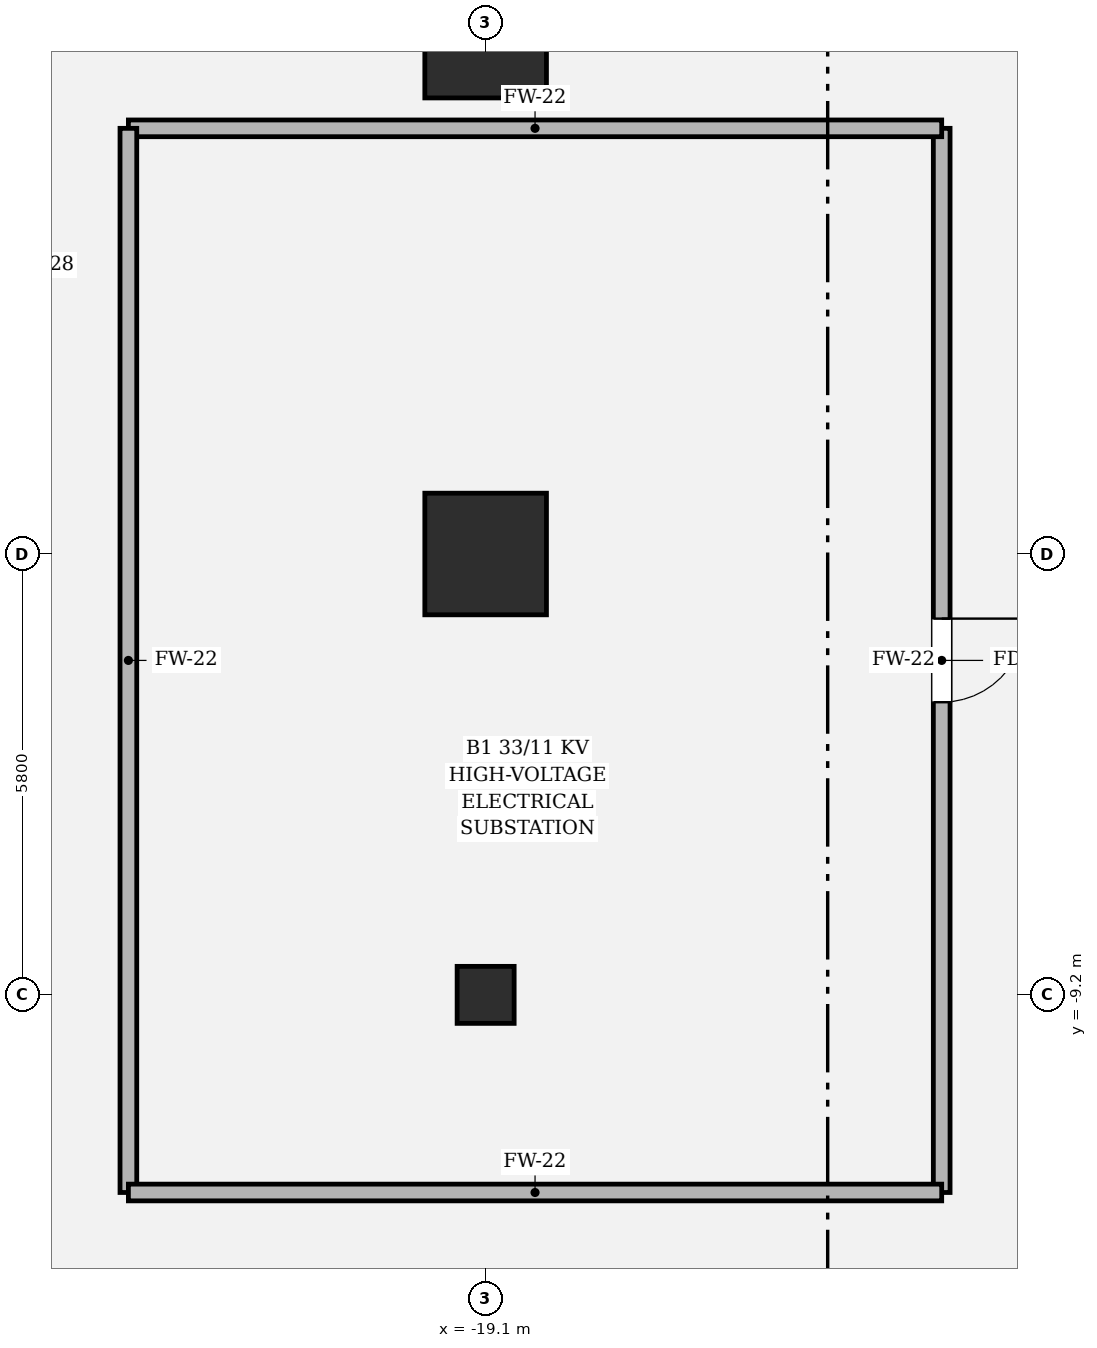
"""IFC4 building model, lengths in metres.
Left out: names, types, materials, properties, quantities, classifications, styles, units other than length and angle.
Written with IfcOpenShell. Run it as: python <this file> out.ifc"""

import sys

from ifc_helpers import new_model, si_unit, direction, frame, frame_2d, origin, origin_2d, place, context, subcontext, project, spatial, rectangle, hollow_rectangle, circle, extrude, element, fill, save


model = new_model("IFC4")
c1 = context("Model", 3, precision=1e-05, world=origin(), true_north=direction((0.0, 1.0)))
c2 = subcontext(c1, "Body", "Model", "MODEL_VIEW")
j1 = project(units=[si_unit("LENGTHUNIT", "METRE"), si_unit("PLANEANGLEUNIT", "RADIAN")], contexts=[c1])
p1 = place(None, origin())
s1 = spatial("IfcSite", under=j1, at=p1, CompositionType="ELEMENT")
p2 = place(p1, origin())
s2 = spatial("IfcBuilding", under=s1, at=p2, CompositionType="ELEMENT")
p3 = place(p2, frame((0.0, 0.0, -4.8)))
s3 = spatial("IfcBuildingStorey", under=s2, at=p3, CompositionType="ELEMENT", Elevation=-4.8)
for number, where, z_axis, x_axis in (
    (1, (-19.1, 3.4, 0.0), (0.0, 0.0, 1.0), (1.0, 0.0, 0.0)),
    (2, (-19.1, -3.4, 0.0), (0.0, 0.0, 1.0), (1.0, 0.0, 0.0)),
):
    element("IfcColumn", number, at=place(p3, frame(where, z_axis=z_axis, x_axis=x_axis)), inside=s3, PredefinedType="COLUMN", context=c2, shape_type="SweptSolid", body=[
        extrude(hollow_rectangle(XDim=1.6, YDim=1.6, WallThickness=0.05, at=origin_2d()), origin(), (0.0, 0.0, 1.0), 4.8),
    ])
p4 = place(p3, frame((-19.1, -9.2, 0.0), z_axis=(0.0, 0.0, 1.0), x_axis=(1.0, 0.0, 0.0)))
e3 = element("IfcColumn", 3, at=p4, inside=s3, PredefinedType="PILASTER", context=c2, shape_type="SweptSolid", body=[
    extrude(circle(Radius=0.375, at=origin_2d()), origin(), (0.0, 0.0, 1.0), 4.8),
])
p5 = place(p3, frame((-13.1, -11.8, 0.0), z_axis=(0.0, 0.0, 1.0), x_axis=(0.0, 1.0, 0.0)))
e4 = element("IfcWall", 4, at=p5, inside=s3, PredefinedType="SOLIDWALL", context=c2, shape_type="SweptSolid", body=[
    extrude(rectangle(XDim=14.0, YDim=0.22, at=frame_2d((7.0, 0.0))), origin(), (0.0, 0.0, 1.0), 3.814),
])
p6 = place(p5, frame((6.45, 0.0, 0.0)))
e5 = element("IfcOpeningElement", 5, at=p6, cuts=e4, PredefinedType="OPENING", context=c2, shape_type="SweptSolid", body=[
    extrude(rectangle(XDim=1.1, YDim=2.2, at=frame_2d((0.55, 1.1))), frame((0.0, 0.12, 0.0), z_axis=(0.0, -1.0, 0.0), x_axis=(1.0, 0.0, 0.0)), (0.0, 0.0, 1.0), 0.24),
])
p7 = place(p3, frame((-13.1, 2.2, 0.0), z_axis=(0.0, 0.0, 1.0), x_axis=(-1.0, 0.0, 0.0)))
e6 = element("IfcWall", 6, at=p7, inside=s3, PredefinedType="SOLIDWALL", context=c2, shape_type="SweptSolid", body=[
    extrude(rectangle(XDim=10.7, YDim=0.22, at=frame_2d((5.35, 0.0))), origin(), (0.0, 0.0, 1.0), 3.814),
])
p8 = place(p3, frame((-23.8, 2.2, 0.0), z_axis=(0.0, 0.0, 1.0), x_axis=(0.0, -1.0, 0.0)))
e7 = element("IfcWall", 7, at=p8, inside=s3, PredefinedType="SOLIDWALL", context=c2, shape_type="SweptSolid", body=[
    extrude(rectangle(XDim=14.0, YDim=0.22, at=frame_2d((7.0, 0.0))), origin(), (0.0, 0.0, 1.0), 3.814),
])
p9 = place(p3, frame((-23.8, -11.8, 0.0), z_axis=(0.0, 0.0, 1.0), x_axis=(1.0, 0.0, 0.0)))
e8 = element("IfcWall", 8, at=p9, inside=s3, PredefinedType="SOLIDWALL", context=c2, shape_type="SweptSolid", body=[
    extrude(rectangle(XDim=10.7, YDim=0.22, at=frame_2d((5.35, 0.0))), origin(), (0.0, 0.0, 1.0), 3.814),
])
p10 = place(p6, origin())
e9 = element("IfcDoor", 9, at=p10, inside=s3, OperationType="SINGLE_SWING_RIGHT", PredefinedType="DOOR", context=c2, shape_type="SweptSolid", body=[
    extrude(rectangle(XDim=1.1, YDim=2.2, at=frame_2d((0.55, 1.1))), frame((0.0, 0.025, 0.0), z_axis=(0.0, -1.0, 0.0), x_axis=(1.0, 0.0, 0.0)), (0.0, 0.0, 1.0), 0.05),
])
fill(e5, e9)
save(model, sys.argv[1])
